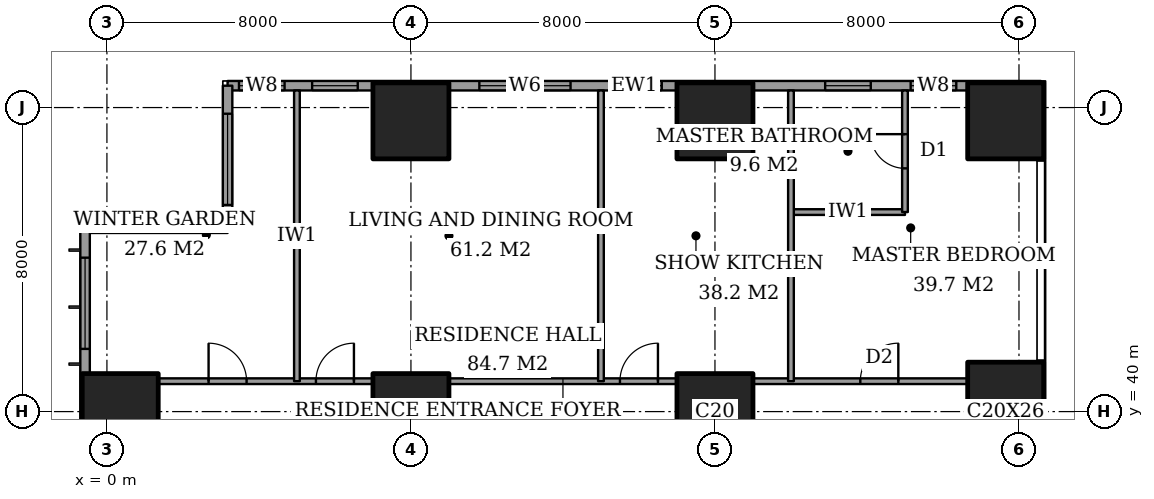
"""IFC4 building model, lengths in metres.
Left out: names, types, materials, properties, quantities, classifications, styles, units other than length and angle.
Written with IfcOpenShell. Run it as: python <this file> out.ifc"""

import sys

from ifc_helpers import new_model, si_unit, direction, frame, frame_2d, origin, origin_2d, place, context, subcontext, project, spatial, rectangle, extrude, element, fill, save


model = new_model("IFC4")
c1 = context("Model", 3, precision=1e-05, world=origin(), true_north=direction((0.0, 1.0)))
c2 = subcontext(c1, "Body", "Model", "MODEL_VIEW")
j1 = project(units=[si_unit("LENGTHUNIT", "METRE"), si_unit("PLANEANGLEUNIT", "RADIAN")], contexts=[c1])
p1 = place(None, origin())
s1 = spatial("IfcSite", under=j1, at=p1, CompositionType="ELEMENT")
p2 = place(p1, origin())
s2 = spatial("IfcBuilding", under=s1, at=p2, CompositionType="ELEMENT")
p3 = place(p2, frame((0.0, 0.0, 40.4)))
s3 = spatial("IfcBuildingStorey", under=s2, at=p3, CompositionType="ELEMENT", Elevation=40.4)
for number, where, z_axis, x_axis in (
    (1, (0.35, 40.0, 0.0), (0.0, 0.0, 1.0), (1.0, 0.0, 0.0)),
    (2, (8.0, 40.0, 0.0), (0.0, 0.0, 1.0), (1.0, 0.0, 0.0)),
    (3, (8.0, 47.65, 0.0), (0.0, 0.0, 1.0), (1.0, 0.0, 0.0)),
    (4, (16.0, 40.0, 0.0), (0.0, 0.0, 1.0), (1.0, 0.0, 0.0)),
    (5, (16.0, 47.65, 0.0), (0.0, 0.0, 1.0), (1.0, 0.0, 0.0)),
):
    element("IfcColumn", number, at=place(p3, frame(where, z_axis=z_axis, x_axis=x_axis)), inside=s3, PredefinedType="COLUMN", context=c2, shape_type="SweptSolid", body=[
        extrude(rectangle(XDim=2.0, YDim=2.0, at=origin_2d()), origin(), (0.0, 0.0, 1.0), 3.6),
    ])
p4 = place(p3, frame((23.65, 40.0, 0.0), z_axis=(0.0, 0.0, 1.0), x_axis=(1.0, 0.0, 0.0)))
e6 = element("IfcColumn", 6, at=p4, inside=s3, PredefinedType="COLUMN", context=c2, shape_type="SweptSolid", body=[
    extrude(rectangle(XDim=2.0, YDim=2.6, at=origin_2d()), origin(), (0.0, 0.0, 1.0), 3.6),
])
p5 = place(p3, frame((23.65, 47.65, 0.0), z_axis=(0.0, 0.0, 1.0), x_axis=(1.0, 0.0, 0.0)))
e7 = element("IfcColumn", 7, at=p5, inside=s3, PredefinedType="COLUMN", context=c2, shape_type="SweptSolid", body=[
    extrude(rectangle(XDim=2.0, YDim=2.0, at=origin_2d()), origin(), (0.0, 0.0, 1.0), 3.6),
])
p6 = place(p3, frame((24.575, 48.575, 0.0), z_axis=(0.0, 0.0, 1.0), x_axis=(-1.0, 0.0, 0.0)))
e8 = element("IfcWall", 8, at=p6, inside=s3, PredefinedType="SOLIDWALL", context=c2, shape_type="SweptSolid", body=[
    extrude(rectangle(XDim=21.4, YDim=0.25, at=frame_2d((10.7, 0.0))), origin(), (0.0, 0.0, 1.0), 3.6),
])
p7 = place(p6, frame((2.225, 0.0, 0.6)))
e9 = element("IfcOpeningElement", 9, at=p7, cuts=e8, PredefinedType="OPENING", context=c2, shape_type="SweptSolid", body=[
    extrude(rectangle(XDim=1.2, YDim=2.0, at=frame_2d((0.6, 1.0))), frame((0.0, 0.135, 0.0), z_axis=(0.0, -1.0, 0.0), x_axis=(1.0, 0.0, 0.0)), (0.0, 0.0, 1.0), 0.27),
])
p8 = place(p6, frame((4.475, 0.0, 0.6)))
e10 = element("IfcOpeningElement", 10, at=p8, cuts=e8, PredefinedType="OPENING", context=c2, shape_type="SweptSolid", body=[
    extrude(rectangle(XDim=1.2, YDim=2.0, at=frame_2d((0.6, 1.0))), frame((0.0, 0.135, 0.0), z_axis=(0.0, -1.0, 0.0), x_axis=(1.0, 0.0, 0.0)), (0.0, 0.0, 1.0), 0.27),
])
p9 = place(p6, frame((9.975, 0.0, 0.6)))
e11 = element("IfcOpeningElement", 11, at=p9, cuts=e8, PredefinedType="OPENING", context=c2, shape_type="SweptSolid", body=[
    extrude(rectangle(XDim=1.2, YDim=2.0, at=frame_2d((0.6, 1.0))), frame((0.0, 0.135, 0.0), z_axis=(0.0, -1.0, 0.0), x_axis=(1.0, 0.0, 0.0)), (0.0, 0.0, 1.0), 0.27),
])
p10 = place(p6, frame((12.375, 0.0, 0.6)))
e12 = element("IfcOpeningElement", 12, at=p10, cuts=e8, PredefinedType="OPENING", context=c2, shape_type="SweptSolid", body=[
    extrude(rectangle(XDim=2.4, YDim=2.0, at=frame_2d((1.2, 1.0))), frame((0.0, 0.135, 0.0), z_axis=(0.0, -1.0, 0.0), x_axis=(1.0, 0.0, 0.0)), (0.0, 0.0, 1.0), 0.27),
])
p11 = place(p6, frame((17.975, 0.0, 0.6)))
e13 = element("IfcOpeningElement", 13, at=p11, cuts=e8, PredefinedType="OPENING", context=c2, shape_type="SweptSolid", body=[
    extrude(rectangle(XDim=1.2, YDim=2.0, at=frame_2d((0.6, 1.0))), frame((0.0, 0.135, 0.0), z_axis=(0.0, -1.0, 0.0), x_axis=(1.0, 0.0, 0.0)), (0.0, 0.0, 1.0), 0.27),
])
p12 = place(p6, frame((19.9, 0.0, 0.6)))
e14 = element("IfcOpeningElement", 14, at=p12, cuts=e8, PredefinedType="OPENING", context=c2, shape_type="SweptSolid", body=[
    extrude(rectangle(XDim=1.2, YDim=2.0, at=frame_2d((0.6, 1.0))), frame((0.0, 0.135, 0.0), z_axis=(0.0, -1.0, 0.0), x_axis=(1.0, 0.0, 0.0)), (0.0, 0.0, 1.0), 0.27),
])
p13 = place(p3, frame((3.175, 48.575, 0.0), z_axis=(0.0, 0.0, 1.0), x_axis=(0.0, -1.0, 0.0)))
e15 = element("IfcWall", 15, at=p13, inside=s3, PredefinedType="SOLIDWALL", context=c2, shape_type="SweptSolid", body=[
    extrude(rectangle(XDim=3.75, YDim=0.25, at=frame_2d((1.875, 0.0))), origin(), (0.0, 0.0, 1.0), 3.6),
])
p14 = place(p13, frame((0.738, 0.0, 0.6)))
e16 = element("IfcOpeningElement", 16, at=p14, cuts=e15, PredefinedType="OPENING", context=c2, shape_type="SweptSolid", body=[
    extrude(rectangle(XDim=2.4, YDim=2.0, at=frame_2d((1.2, 1.0))), frame((0.0, 0.135, 0.0), z_axis=(0.0, -1.0, 0.0), x_axis=(1.0, 0.0, 0.0)), (0.0, 0.0, 1.0), 0.27),
])
p15 = place(p3, frame((3.175, 44.825, 0.0), z_axis=(0.0, 0.0, 1.0), x_axis=(-1.0, 0.0, 0.0)))
e17 = element("IfcWall", 17, at=p15, inside=s3, PredefinedType="SOLIDWALL", context=c2, shape_type="SweptSolid", body=[
    extrude(rectangle(XDim=3.75, YDim=0.25, at=frame_2d((1.875, 0.0))), origin(), (0.0, 0.0, 1.0), 3.6),
])
p16 = place(p15, frame((0.613, 0.0, 0.6)))
e18 = element("IfcOpeningElement", 18, at=p16, cuts=e17, PredefinedType="OPENING", context=c2, shape_type="SweptSolid", body=[
    extrude(rectangle(XDim=2.4, YDim=2.0, at=frame_2d((1.2, 1.0))), frame((0.0, 0.135, 0.0), z_axis=(0.0, -1.0, 0.0), x_axis=(1.0, 0.0, 0.0)), (0.0, 0.0, 1.0), 0.27),
])
p17 = place(p3, frame((-0.575, 44.825, 0.0), z_axis=(0.0, 0.0, 1.0), x_axis=(0.0, -1.0, 0.0)))
e19 = element("IfcWall", 19, at=p17, inside=s3, PredefinedType="SOLIDWALL", context=c2, shape_type="SweptSolid", body=[
    extrude(rectangle(XDim=41.65, YDim=0.25, at=frame_2d((20.825, 0.0))), origin(), (0.0, 0.0, 1.0), 3.6),
])
p18 = place(p17, frame((0.775, 0.0, 0.6)))
e20 = element("IfcOpeningElement", 20, at=p18, cuts=e19, PredefinedType="OPENING", context=c2, shape_type="SweptSolid", body=[
    extrude(rectangle(XDim=2.4, YDim=2.0, at=frame_2d((1.2, 1.0))), frame((0.0, 0.135, 0.0), z_axis=(0.0, -1.0, 0.0), x_axis=(1.0, 0.0, 0.0)), (0.0, 0.0, 1.0), 0.27),
])
p19 = place(p17, frame((6.1, 0.0, 0.6)))
e21 = element("IfcOpeningElement", 21, at=p19, cuts=e19, PredefinedType="OPENING", context=c2, shape_type="SweptSolid", body=[
    extrude(rectangle(XDim=1.2, YDim=2.0, at=frame_2d((0.6, 1.0))), frame((0.0, 0.135, 0.0), z_axis=(0.0, -1.0, 0.0), x_axis=(1.0, 0.0, 0.0)), (0.0, 0.0, 1.0), 0.27),
])
p20 = place(p17, frame((8.425, 0.0, 0.6)))
e22 = element("IfcOpeningElement", 22, at=p20, cuts=e19, PredefinedType="OPENING", context=c2, shape_type="SweptSolid", body=[
    extrude(rectangle(XDim=2.4, YDim=2.0, at=frame_2d((1.2, 1.0))), frame((0.0, 0.135, 0.0), z_axis=(0.0, -1.0, 0.0), x_axis=(1.0, 0.0, 0.0)), (0.0, 0.0, 1.0), 0.27),
])
p21 = place(p17, frame((15.625, 0.0, 0.6)))
e23 = element("IfcOpeningElement", 23, at=p21, cuts=e19, PredefinedType="OPENING", context=c2, shape_type="SweptSolid", body=[
    extrude(rectangle(XDim=2.4, YDim=2.0, at=frame_2d((1.2, 1.0))), frame((0.0, 0.135, 0.0), z_axis=(0.0, -1.0, 0.0), x_axis=(1.0, 0.0, 0.0)), (0.0, 0.0, 1.0), 0.27),
])
p22 = place(p17, frame((23.625, 0.0, 0.6)))
e24 = element("IfcOpeningElement", 24, at=p22, cuts=e19, PredefinedType="OPENING", context=c2, shape_type="SweptSolid", body=[
    extrude(rectangle(XDim=2.4, YDim=2.0, at=frame_2d((1.2, 1.0))), frame((0.0, 0.135, 0.0), z_axis=(0.0, -1.0, 0.0), x_axis=(1.0, 0.0, 0.0)), (0.0, 0.0, 1.0), 0.27),
])
p23 = place(p17, frame((30.825, 0.0, 0.6)))
e25 = element("IfcOpeningElement", 25, at=p23, cuts=e19, PredefinedType="OPENING", context=c2, shape_type="SweptSolid", body=[
    extrude(rectangle(XDim=2.4, YDim=2.0, at=frame_2d((1.2, 1.0))), frame((0.0, 0.135, 0.0), z_axis=(0.0, -1.0, 0.0), x_axis=(1.0, 0.0, 0.0)), (0.0, 0.0, 1.0), 0.27),
])
p24 = place(p17, frame((34.5, 0.0, 0.6)))
e26 = element("IfcOpeningElement", 26, at=p24, cuts=e19, PredefinedType="OPENING", context=c2, shape_type="SweptSolid", body=[
    extrude(rectangle(XDim=1.2, YDim=2.0, at=frame_2d((0.6, 1.0))), frame((0.0, 0.135, 0.0), z_axis=(0.0, -1.0, 0.0), x_axis=(1.0, 0.0, 0.0)), (0.0, 0.0, 1.0), 0.27),
])
p25 = place(p17, frame((38.475, 0.0, 0.6)))
e27 = element("IfcOpeningElement", 27, at=p25, cuts=e19, PredefinedType="OPENING", context=c2, shape_type="SweptSolid", body=[
    extrude(rectangle(XDim=2.4, YDim=2.0, at=frame_2d((1.2, 1.0))), frame((0.0, 0.135, 0.0), z_axis=(0.0, -1.0, 0.0), x_axis=(1.0, 0.0, 0.0)), (0.0, 0.0, 1.0), 0.27),
])
p26 = place(p3, frame((1.35, 40.8, 0.0), z_axis=(0.0, 0.0, 1.0), x_axis=(1.0, 0.0, 0.0)))
e28 = element("IfcWall", 28, at=p26, inside=s3, PredefinedType="PARTITIONING", context=c2, shape_type="SweptSolid", body=[
    extrude(rectangle(XDim=5.65, YDim=0.15, at=frame_2d((2.825, 0.0))), origin(), (0.0, 0.0, 1.0), 3.35),
])
p27 = place(p26, frame((1.325, 0.0, 0.0)))
e29 = element("IfcOpeningElement", 29, at=p27, cuts=e28, PredefinedType="OPENING", context=c2, shape_type="SweptSolid", body=[
    extrude(rectangle(XDim=1.0, YDim=2.1, at=frame_2d((0.5, 1.05))), frame((0.0, 0.085, 0.0), z_axis=(0.0, -1.0, 0.0), x_axis=(1.0, 0.0, 0.0)), (0.0, 0.0, 1.0), 0.17),
])
p28 = place(p26, frame((4.15, 0.0, 0.0)))
e30 = element("IfcOpeningElement", 30, at=p28, cuts=e28, PredefinedType="OPENING", context=c2, shape_type="SweptSolid", body=[
    extrude(rectangle(XDim=1.0, YDim=2.1, at=frame_2d((0.5, 1.05))), frame((0.0, 0.085, 0.0), z_axis=(0.0, -1.0, 0.0), x_axis=(1.0, 0.0, 0.0)), (0.0, 0.0, 1.0), 0.17),
])
p29 = place(p3, frame((9.0, 40.8, 0.0), z_axis=(0.0, 0.0, 1.0), x_axis=(1.0, 0.0, 0.0)))
e31 = element("IfcWall", 31, at=p29, inside=s3, PredefinedType="PARTITIONING", context=c2, shape_type="SweptSolid", body=[
    extrude(rectangle(XDim=6.0, YDim=0.15, at=frame_2d((3.0, 0.0))), origin(), (0.0, 0.0, 1.0), 3.35),
])
p30 = place(p29, frame((4.5, 0.0, 0.0)))
e32 = element("IfcOpeningElement", 32, at=p30, cuts=e31, PredefinedType="OPENING", context=c2, shape_type="SweptSolid", body=[
    extrude(rectangle(XDim=1.0, YDim=2.1, at=frame_2d((0.5, 1.05))), frame((0.0, 0.085, 0.0), z_axis=(0.0, -1.0, 0.0), x_axis=(1.0, 0.0, 0.0)), (0.0, 0.0, 1.0), 0.17),
])
p31 = place(p3, frame((17.0, 40.8, 0.0), z_axis=(0.0, 0.0, 1.0), x_axis=(1.0, 0.0, 0.0)))
e33 = element("IfcWall", 33, at=p31, inside=s3, PredefinedType="PARTITIONING", context=c2, shape_type="SweptSolid", body=[
    extrude(rectangle(XDim=5.65, YDim=0.15, at=frame_2d((2.825, 0.0))), origin(), (0.0, 0.0, 1.0), 3.35),
])
p32 = place(p31, frame((2.825, 0.0, 0.0)))
e34 = element("IfcOpeningElement", 34, at=p32, cuts=e33, PredefinedType="OPENING", context=c2, shape_type="SweptSolid", body=[
    extrude(rectangle(XDim=1.0, YDim=2.1, at=frame_2d((0.5, 1.05))), frame((0.0, 0.085, 0.0), z_axis=(0.0, -1.0, 0.0), x_axis=(1.0, 0.0, 0.0)), (0.0, 0.0, 1.0), 0.17),
])
p33 = place(p3, frame((18.0, 45.25, 0.0), z_axis=(0.0, 0.0, 1.0), x_axis=(1.0, 0.0, 0.0)))
e35 = element("IfcWall", 35, at=p33, inside=s3, PredefinedType="PARTITIONING", context=c2, shape_type="SweptSolid", body=[
    extrude(rectangle(XDim=3.0, YDim=0.15, at=frame_2d((1.5, 0.0))), origin(), (0.0, 0.0, 1.0), 3.35),
])
for number, where, z_axis, x_axis in (
    (36, (5.0, 40.8, 0.0), (0.0, 0.0, 1.0), (0.0, 1.0, 0.0)),
    (37, (13.0, 40.8, 0.0), (0.0, 0.0, 1.0), (0.0, 1.0, 0.0)),
    (38, (18.0, 40.8, 0.0), (0.0, 0.0, 1.0), (0.0, 1.0, 0.0)),
):
    element("IfcWall", number, at=place(p3, frame(where, z_axis=z_axis, x_axis=x_axis)), inside=s3, PredefinedType="PARTITIONING", context=c2, shape_type="SweptSolid", body=[
        extrude(rectangle(XDim=7.65, YDim=0.15, at=frame_2d((3.825, 0.0))), origin(), (0.0, 0.0, 1.0), 3.35),
    ])
p34 = place(p3, frame((21.0, 45.25, 0.0), z_axis=(0.0, 0.0, 1.0), x_axis=(0.0, 1.0, 0.0)))
e39 = element("IfcWall", 39, at=p34, inside=s3, PredefinedType="PARTITIONING", context=c2, shape_type="SweptSolid", body=[
    extrude(rectangle(XDim=3.2, YDim=0.15, at=frame_2d((1.6, 0.0))), origin(), (0.0, 0.0, 1.0), 3.35),
])
p35 = place(p34, frame((1.15, 0.0, 0.0)))
e40 = element("IfcOpeningElement", 40, at=p35, cuts=e39, PredefinedType="OPENING", context=c2, shape_type="SweptSolid", body=[
    extrude(rectangle(XDim=0.9, YDim=2.1, at=frame_2d((0.45, 1.05))), frame((0.0, 0.085, 0.0), z_axis=(0.0, -1.0, 0.0), x_axis=(1.0, 0.0, 0.0)), (0.0, 0.0, 1.0), 0.17),
])
p36 = place(p7, origin())
e41 = element("IfcWindow", 41, at=p36, inside=s3, PartitioningType="SINGLE_PANEL", PredefinedType="WINDOW", context=c2, shape_type="SweptSolid", body=[
    extrude(rectangle(XDim=1.2, YDim=2.0, at=frame_2d((0.6, 1.0))), frame((0.0, 0.03, 0.0), z_axis=(0.0, -1.0, 0.0), x_axis=(1.0, 0.0, 0.0)), (0.0, 0.0, 1.0), 0.06),
])
fill(e9, e41)
p37 = place(p8, origin())
e42 = element("IfcWindow", 42, at=p37, inside=s3, PartitioningType="SINGLE_PANEL", PredefinedType="WINDOW", context=c2, shape_type="SweptSolid", body=[
    extrude(rectangle(XDim=1.2, YDim=2.0, at=frame_2d((0.6, 1.0))), frame((0.0, 0.03, 0.0), z_axis=(0.0, -1.0, 0.0), x_axis=(1.0, 0.0, 0.0)), (0.0, 0.0, 1.0), 0.06),
])
fill(e10, e42)
p38 = place(p9, origin())
e43 = element("IfcWindow", 43, at=p38, inside=s3, PartitioningType="SINGLE_PANEL", PredefinedType="WINDOW", context=c2, shape_type="SweptSolid", body=[
    extrude(rectangle(XDim=1.2, YDim=2.0, at=frame_2d((0.6, 1.0))), frame((0.0, 0.03, 0.0), z_axis=(0.0, -1.0, 0.0), x_axis=(1.0, 0.0, 0.0)), (0.0, 0.0, 1.0), 0.06),
])
fill(e11, e43)
p39 = place(p10, origin())
e44 = element("IfcWindow", 44, at=p39, inside=s3, PartitioningType="SINGLE_PANEL", PredefinedType="WINDOW", context=c2, shape_type="SweptSolid", body=[
    extrude(rectangle(XDim=2.4, YDim=2.0, at=frame_2d((1.2, 1.0))), frame((0.0, 0.03, 0.0), z_axis=(0.0, -1.0, 0.0), x_axis=(1.0, 0.0, 0.0)), (0.0, 0.0, 1.0), 0.06),
])
fill(e12, e44)
p40 = place(p11, origin())
e45 = element("IfcWindow", 45, at=p40, inside=s3, PartitioningType="SINGLE_PANEL", PredefinedType="WINDOW", context=c2, shape_type="SweptSolid", body=[
    extrude(rectangle(XDim=1.2, YDim=2.0, at=frame_2d((0.6, 1.0))), frame((0.0, 0.03, 0.0), z_axis=(0.0, -1.0, 0.0), x_axis=(1.0, 0.0, 0.0)), (0.0, 0.0, 1.0), 0.06),
])
fill(e13, e45)
p41 = place(p12, origin())
e46 = element("IfcWindow", 46, at=p41, inside=s3, PartitioningType="SINGLE_PANEL", PredefinedType="WINDOW", context=c2, shape_type="SweptSolid", body=[
    extrude(rectangle(XDim=1.2, YDim=2.0, at=frame_2d((0.6, 1.0))), frame((0.0, 0.03, 0.0), z_axis=(0.0, -1.0, 0.0), x_axis=(1.0, 0.0, 0.0)), (0.0, 0.0, 1.0), 0.06),
])
fill(e14, e46)
p42 = place(p14, origin())
e47 = element("IfcWindow", 47, at=p42, inside=s3, PartitioningType="SINGLE_PANEL", PredefinedType="WINDOW", context=c2, shape_type="SweptSolid", body=[
    extrude(rectangle(XDim=2.4, YDim=2.0, at=frame_2d((1.2, 1.0))), frame((0.0, 0.03, 0.0), z_axis=(0.0, -1.0, 0.0), x_axis=(1.0, 0.0, 0.0)), (0.0, 0.0, 1.0), 0.06),
])
fill(e16, e47)
p43 = place(p16, origin())
e48 = element("IfcWindow", 48, at=p43, inside=s3, PartitioningType="SINGLE_PANEL", PredefinedType="WINDOW", context=c2, shape_type="SweptSolid", body=[
    extrude(rectangle(XDim=2.4, YDim=2.0, at=frame_2d((1.2, 1.0))), frame((0.0, 0.03, 0.0), z_axis=(0.0, -1.0, 0.0), x_axis=(1.0, 0.0, 0.0)), (0.0, 0.0, 1.0), 0.06),
])
fill(e18, e48)
p44 = place(p18, origin())
e49 = element("IfcWindow", 49, at=p44, inside=s3, PartitioningType="SINGLE_PANEL", PredefinedType="WINDOW", context=c2, shape_type="SweptSolid", body=[
    extrude(rectangle(XDim=2.4, YDim=2.0, at=frame_2d((1.2, 1.0))), frame((0.0, 0.03, 0.0), z_axis=(0.0, -1.0, 0.0), x_axis=(1.0, 0.0, 0.0)), (0.0, 0.0, 1.0), 0.06),
])
fill(e20, e49)
p45 = place(p27, origin())
e50 = element("IfcDoor", 50, at=p45, inside=s3, OperationType="SINGLE_SWING_RIGHT", PredefinedType="DOOR", context=c2, shape_type="SweptSolid", body=[
    extrude(rectangle(XDim=1.0, YDim=2.1, at=frame_2d((0.5, 1.05))), frame((0.0, 0.025, 0.0), z_axis=(0.0, -1.0, 0.0), x_axis=(1.0, 0.0, 0.0)), (0.0, 0.0, 1.0), 0.05),
])
fill(e29, e50)
p46 = place(p28, origin())
e51 = element("IfcDoor", 51, at=p46, inside=s3, OperationType="SINGLE_SWING_LEFT", PredefinedType="DOOR", context=c2, shape_type="SweptSolid", body=[
    extrude(rectangle(XDim=1.0, YDim=2.1, at=frame_2d((0.5, 1.05))), frame((0.0, 0.025, 0.0), z_axis=(0.0, -1.0, 0.0), x_axis=(1.0, 0.0, 0.0)), (0.0, 0.0, 1.0), 0.05),
])
fill(e30, e51)
p47 = place(p30, origin())
e52 = element("IfcDoor", 52, at=p47, inside=s3, OperationType="SINGLE_SWING_LEFT", PredefinedType="DOOR", context=c2, shape_type="SweptSolid", body=[
    extrude(rectangle(XDim=1.0, YDim=2.1, at=frame_2d((0.5, 1.05))), frame((0.0, 0.025, 0.0), z_axis=(0.0, -1.0, 0.0), x_axis=(1.0, 0.0, 0.0)), (0.0, 0.0, 1.0), 0.05),
])
fill(e32, e52)
p48 = place(p35, origin())
e53 = element("IfcDoor", 53, at=p48, inside=s3, OperationType="SINGLE_SWING_LEFT", PredefinedType="DOOR", context=c2, shape_type="SweptSolid", body=[
    extrude(rectangle(XDim=0.9, YDim=2.1, at=frame_2d((0.45, 1.05))), frame((0.0, 0.025, 0.0), z_axis=(0.0, -1.0, 0.0), x_axis=(1.0, 0.0, 0.0)), (0.0, 0.0, 1.0), 0.05),
])
fill(e40, e53)
p49 = place(p32, origin())
e54 = element("IfcDoor", 54, at=p49, inside=s3, OperationType="SINGLE_SWING_LEFT", PredefinedType="DOOR", context=c2, shape_type="SweptSolid", body=[
    extrude(rectangle(XDim=1.0, YDim=2.1, at=frame_2d((0.5, 1.05))), frame((0.0, 0.025, 0.0), z_axis=(0.0, -1.0, 0.0), x_axis=(1.0, 0.0, 0.0)), (0.0, 0.0, 1.0), 0.05),
])
fill(e34, e54)
save(model, sys.argv[1])
